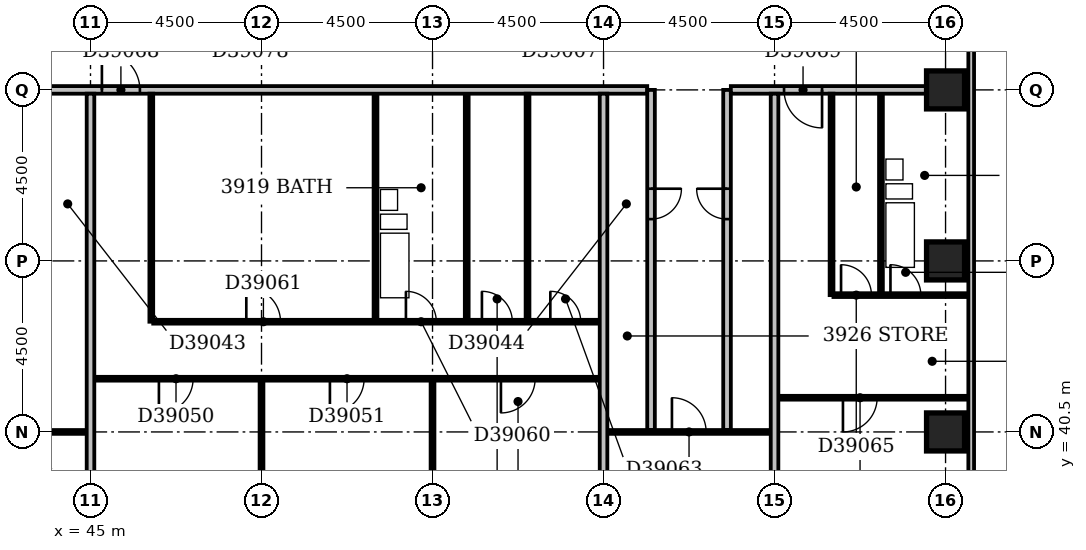
"""IFC4 building model, lengths in metres.
Left out: names, types, materials, properties, quantities, classifications, styles, units other than length and angle.
Written with IfcOpenShell. Run it as: python <this file> out.ifc"""

import sys

from ifc_helpers import new_model, si_unit, direction, frame, frame_2d, origin, origin_2d, place, context, subcontext, project, spatial, rectangle, extrude, element, fill, save


model = new_model("IFC4")
c1 = context("Model", 3, precision=1e-05, world=origin(), true_north=direction((0.0, 1.0)))
c2 = subcontext(c1, "Body", "Model", "MODEL_VIEW")
j1 = project(units=[si_unit("LENGTHUNIT", "METRE"), si_unit("PLANEANGLEUNIT", "RADIAN")], contexts=[c1])
p1 = place(None, origin())
s1 = spatial("IfcSite", under=j1, at=p1, CompositionType="ELEMENT")
p2 = place(p1, origin())
s2 = spatial("IfcBuilding", under=s1, at=p2, CompositionType="ELEMENT")
p3 = place(p2, frame((0.0, 0.0, 155.6)))
s3 = spatial("IfcBuildingStorey", under=s2, at=p3, CompositionType="ELEMENT", Elevation=155.6)
for number, where, z_axis, x_axis in (
    (1, (67.5, 40.5, -0.3), (0.0, 0.0, 1.0), (1.0, 0.0, 0.0)),
    (2, (67.5, 45.0, -0.3), (0.0, 0.0, 1.0), (1.0, 0.0, 0.0)),
    (3, (67.5, 49.5, -0.3), (0.0, 0.0, 1.0), (1.0, 0.0, 0.0)),
):
    element("IfcColumn", number, at=place(p3, frame(where, z_axis=z_axis, x_axis=x_axis)), inside=s3, PredefinedType="COLUMN", context=c2, shape_type="SweptSolid", body=[
        extrude(rectangle(XDim=1.0, YDim=1.0, at=origin_2d()), origin(), (0.0, 0.0, 1.0), 3.6),
    ])
p4 = place(p3, frame((68.175, 35.4, 0.0), z_axis=(0.0, 0.0, 1.0), x_axis=(0.0, 1.0, 0.0)))
e4 = element("IfcWall", 4, at=p4, inside=s3, PredefinedType="STANDARD", context=c2, shape_type="SweptSolid", body=[
    extrude(rectangle(XDim=23.85, YDim=0.15, at=frame_2d((11.925, 0.0))), origin(), (0.0, 0.0, 1.0), 2.7),
])
p5 = place(p4, frame((1.65, 0.0, 0.6)))
e5 = element("IfcOpeningElement", 5, at=p5, cuts=e4, PredefinedType="OPENING", context=c2, shape_type="SweptSolid", body=[
    extrude(rectangle(XDim=2.4, YDim=1.8, at=frame_2d((1.2, 0.9))), frame((0.0, 0.087, 0.0), z_axis=(0.0, -1.0, 0.0), x_axis=(1.0, 0.0, 0.0)), (0.0, 0.0, 1.0), 0.174),
])
p6 = place(p4, frame((19.65, 0.0, 0.6)))
e6 = element("IfcOpeningElement", 6, at=p6, cuts=e4, PredefinedType="OPENING", context=c2, shape_type="SweptSolid", body=[
    extrude(rectangle(XDim=2.4, YDim=1.8, at=frame_2d((1.2, 0.9))), frame((0.0, 0.087, 0.0), z_axis=(0.0, -1.0, 0.0), x_axis=(1.0, 0.0, 0.0)), (0.0, 0.0, 1.0), 0.174),
])
p7 = place(p3, frame((45.0, 36.5, 0.0), z_axis=(0.0, 0.0, 1.0), x_axis=(0.0, 1.0, 0.0)))
e7 = element("IfcWall", 7, at=p7, inside=s3, PredefinedType="PARTITIONING", context=c2, shape_type="SweptSolid", body=[
    extrude(rectangle(XDim=12.9, YDim=0.2, at=frame_2d((6.45, 0.0))), origin(), (0.0, 0.0, 1.0), 2.6),
])
p8 = place(p3, frame((49.5, 36.5, 0.0), z_axis=(0.0, 0.0, 1.0), x_axis=(0.0, 1.0, 0.0)))
e8 = element("IfcWall", 8, at=p8, inside=s3, PredefinedType="PARTITIONING", context=c2, shape_type="SweptSolid", body=[
    extrude(rectangle(XDim=5.35, YDim=0.1, at=frame_2d((2.675, 0.0))), origin(), (0.0, 0.0, 1.0), 3.3),
])
p9 = place(p3, frame((54.0, 36.5, 0.0), z_axis=(0.0, 0.0, 1.0), x_axis=(0.0, 1.0, 0.0)))
e9 = element("IfcWall", 9, at=p9, inside=s3, PredefinedType="PARTITIONING", context=c2, shape_type="SweptSolid", body=[
    extrude(rectangle(XDim=5.35, YDim=0.1, at=frame_2d((2.675, 0.0))), origin(), (0.0, 0.0, 1.0), 2.6),
])
p10 = place(p3, frame((58.5, 36.5, 0.0), z_axis=(0.0, 0.0, 1.0), x_axis=(0.0, 1.0, 0.0)))
e10 = element("IfcWall", 10, at=p10, inside=s3, PredefinedType="PARTITIONING", context=c2, shape_type="SweptSolid", body=[
    extrude(rectangle(XDim=12.9, YDim=0.2, at=frame_2d((6.45, 0.0))), origin(), (0.0, 0.0, 1.0), 3.3),
])
p11 = place(p3, frame((63.0, 36.5, 0.0), z_axis=(0.0, 0.0, 1.0), x_axis=(0.0, 1.0, 0.0)))
e11 = element("IfcWall", 11, at=p11, inside=s3, PredefinedType="PARTITIONING", context=c2, shape_type="SweptSolid", body=[
    extrude(rectangle(XDim=12.9, YDim=0.2, at=frame_2d((6.45, 0.0))), origin(), (0.0, 0.0, 1.0), 2.4),
])
p12 = place(p3, frame((40.6, 40.5, 0.0), z_axis=(0.0, 0.0, 1.0), x_axis=(1.0, 0.0, 0.0)))
e12 = element("IfcWall", 12, at=p12, inside=s3, PredefinedType="PARTITIONING", context=c2, shape_type="SweptSolid", body=[
    extrude(rectangle(XDim=4.3, YDim=0.1, at=frame_2d((2.15, 0.0))), origin(), (0.0, 0.0, 1.0), 3.3),
])
p13 = place(p12, frame((1.7, 0.0, 0.0)))
e13 = element("IfcOpeningElement", 13, at=p13, cuts=e12, PredefinedType="OPENING", context=c2, shape_type="SweptSolid", body=[
    extrude(rectangle(XDim=0.9, YDim=2.1, at=frame_2d((0.45, 1.05))), frame((0.0, 0.062, 0.0), z_axis=(0.0, -1.0, 0.0), x_axis=(1.0, 0.0, 0.0)), (0.0, 0.0, 1.0), 0.124),
])
p14 = place(p3, frame((58.6, 40.5, 0.0), z_axis=(0.0, 0.0, 1.0), x_axis=(1.0, 0.0, 0.0)))
e14 = element("IfcWall", 14, at=p14, inside=s3, PredefinedType="PARTITIONING", context=c2, shape_type="SweptSolid", body=[
    extrude(rectangle(XDim=4.3, YDim=0.1, at=frame_2d((2.15, 0.0))), origin(), (0.0, 0.0, 1.0), 3.3),
])
p15 = place(p14, frame((1.7, 0.0, 0.0)))
e15 = element("IfcOpeningElement", 15, at=p15, cuts=e14, PredefinedType="OPENING", context=c2, shape_type="SweptSolid", body=[
    extrude(rectangle(XDim=0.9, YDim=2.1, at=frame_2d((0.45, 1.05))), frame((0.0, 0.062, 0.0), z_axis=(0.0, -1.0, 0.0), x_axis=(1.0, 0.0, 0.0)), (0.0, 0.0, 1.0), 0.124),
])
p16 = place(p3, frame((59.75, 40.55, 0.0), z_axis=(0.0, 0.0, 1.0), x_axis=(0.0, 1.0, 0.0)))
e16 = element("IfcWall", 16, at=p16, inside=s3, PredefinedType="PARTITIONING", context=c2, shape_type="SweptSolid", body=[
    extrude(rectangle(XDim=8.95, YDim=0.2, at=frame_2d((4.475, 0.0))), origin(), (0.0, 0.0, 1.0), 3.3),
])
p17 = place(p16, frame((5.55, 0.0, 0.0)))
e17 = element("IfcOpeningElement", 17, at=p17, cuts=e16, PredefinedType="OPENING", context=c2, shape_type="SweptSolid", body=[
    extrude(rectangle(XDim=0.8, YDim=2.1, at=frame_2d((0.4, 1.05))), frame((0.0, 0.112, 0.0), z_axis=(0.0, -1.0, 0.0), x_axis=(1.0, 0.0, 0.0)), (0.0, 0.0, 1.0), 0.224),
])
p18 = place(p3, frame((61.75, 40.55, 0.0), z_axis=(0.0, 0.0, 1.0), x_axis=(0.0, 1.0, 0.0)))
e18 = element("IfcWall", 18, at=p18, inside=s3, PredefinedType="PARTITIONING", context=c2, shape_type="SweptSolid", body=[
    extrude(rectangle(XDim=8.95, YDim=0.2, at=frame_2d((4.475, 0.0))), origin(), (0.0, 0.0, 1.0), 3.3),
])
p19 = place(p18, frame((5.55, 0.0, 0.0)))
e19 = element("IfcOpeningElement", 19, at=p19, cuts=e18, PredefinedType="OPENING", context=c2, shape_type="SweptSolid", body=[
    extrude(rectangle(XDim=0.8, YDim=2.1, at=frame_2d((0.4, 1.05))), frame((0.0, 0.112, 0.0), z_axis=(0.0, -1.0, 0.0), x_axis=(1.0, 0.0, 0.0)), (0.0, 0.0, 1.0), 0.224),
])
p20 = place(p3, frame((63.1, 41.4, 0.0), z_axis=(0.0, 0.0, 1.0), x_axis=(1.0, 0.0, 0.0)))
e20 = element("IfcWall", 20, at=p20, inside=s3, PredefinedType="PARTITIONING", context=c2, shape_type="SweptSolid", body=[
    extrude(rectangle(XDim=5.0, YDim=0.1, at=frame_2d((2.5, 0.0))), origin(), (0.0, 0.0, 1.0), 3.3),
])
p21 = place(p20, frame((1.7, 0.0, 0.0)))
e21 = element("IfcOpeningElement", 21, at=p21, cuts=e20, PredefinedType="OPENING", context=c2, shape_type="SweptSolid", body=[
    extrude(rectangle(XDim=0.9, YDim=2.1, at=frame_2d((0.45, 1.05))), frame((0.0, 0.062, 0.0), z_axis=(0.0, -1.0, 0.0), x_axis=(1.0, 0.0, 0.0)), (0.0, 0.0, 1.0), 0.124),
])
p22 = place(p3, frame((45.1, 41.9, 0.0), z_axis=(0.0, 0.0, 1.0), x_axis=(1.0, 0.0, 0.0)))
e22 = element("IfcWall", 22, at=p22, inside=s3, PredefinedType="PARTITIONING", context=c2, shape_type="SweptSolid", body=[
    extrude(rectangle(XDim=13.3, YDim=0.1, at=frame_2d((6.65, 0.0))), origin(), (0.0, 0.0, 1.0), 3.3),
])
p23 = place(p22, frame((1.7, 0.0, 0.0)))
e23 = element("IfcOpeningElement", 23, at=p23, cuts=e22, PredefinedType="OPENING", context=c2, shape_type="SweptSolid", body=[
    extrude(rectangle(XDim=0.9, YDim=2.1, at=frame_2d((0.45, 1.05))), frame((0.0, 0.062, 0.0), z_axis=(0.0, -1.0, 0.0), x_axis=(1.0, 0.0, 0.0)), (0.0, 0.0, 1.0), 0.124),
])
p24 = place(p22, frame((6.2, 0.0, 0.0)))
e24 = element("IfcOpeningElement", 24, at=p24, cuts=e22, PredefinedType="OPENING", context=c2, shape_type="SweptSolid", body=[
    extrude(rectangle(XDim=0.9, YDim=2.1, at=frame_2d((0.45, 1.05))), frame((0.0, 0.062, 0.0), z_axis=(0.0, -1.0, 0.0), x_axis=(1.0, 0.0, 0.0)), (0.0, 0.0, 1.0), 0.124),
])
p25 = place(p22, frame((10.7, 0.0, 0.0)))
e25 = element("IfcOpeningElement", 25, at=p25, cuts=e22, PredefinedType="OPENING", context=c2, shape_type="SweptSolid", body=[
    extrude(rectangle(XDim=0.9, YDim=2.1, at=frame_2d((0.45, 1.05))), frame((0.0, 0.062, 0.0), z_axis=(0.0, -1.0, 0.0), x_axis=(1.0, 0.0, 0.0)), (0.0, 0.0, 1.0), 0.124),
])
p26 = place(p3, frame((46.6, 43.4, 0.0), z_axis=(0.0, 0.0, 1.0), x_axis=(0.0, 1.0, 0.0)))
e26 = element("IfcWall", 26, at=p26, inside=s3, PredefinedType="PARTITIONING", context=c2, shape_type="SweptSolid", body=[
    extrude(rectangle(XDim=6.0, YDim=0.1, at=frame_2d((3.0, 0.0))), origin(), (0.0, 0.0, 1.0), 3.3),
])
p27 = place(p3, frame((46.65, 43.4, 0.0), z_axis=(0.0, 0.0, 1.0), x_axis=(1.0, 0.0, 0.0)))
e27 = element("IfcWall", 27, at=p27, inside=s3, PredefinedType="PARTITIONING", context=c2, shape_type="SweptSolid", body=[
    extrude(rectangle(XDim=11.75, YDim=0.1, at=frame_2d((5.875, 0.0))), origin(), (0.0, 0.0, 1.0), 3.3),
])
p28 = place(p27, frame((6.65, 0.0, 0.0)))
e28 = element("IfcOpeningElement", 28, at=p28, cuts=e27, PredefinedType="OPENING", context=c2, shape_type="SweptSolid", body=[
    extrude(rectangle(XDim=0.8, YDim=2.1, at=frame_2d((0.4, 1.05))), frame((0.0, 0.062, 0.0), z_axis=(0.0, -1.0, 0.0), x_axis=(1.0, 0.0, 0.0)), (0.0, 0.0, 1.0), 0.124),
])
p29 = place(p27, frame((2.45, 0.0, 0.0)))
e29 = element("IfcOpeningElement", 29, at=p29, cuts=e27, PredefinedType="OPENING", context=c2, shape_type="SweptSolid", body=[
    extrude(rectangle(XDim=0.9, YDim=2.1, at=frame_2d((0.45, 1.05))), frame((0.0, 0.062, 0.0), z_axis=(0.0, -1.0, 0.0), x_axis=(1.0, 0.0, 0.0)), (0.0, 0.0, 1.0), 0.124),
])
p30 = place(p27, frame((8.65, 0.0, 0.0)))
e30 = element("IfcOpeningElement", 30, at=p30, cuts=e27, PredefinedType="OPENING", context=c2, shape_type="SweptSolid", body=[
    extrude(rectangle(XDim=0.8, YDim=2.1, at=frame_2d((0.4, 1.05))), frame((0.0, 0.062, 0.0), z_axis=(0.0, -1.0, 0.0), x_axis=(1.0, 0.0, 0.0)), (0.0, 0.0, 1.0), 0.124),
])
p31 = place(p27, frame((10.45, 0.0, 0.0)))
e31 = element("IfcOpeningElement", 31, at=p31, cuts=e27, PredefinedType="OPENING", context=c2, shape_type="SweptSolid", body=[
    extrude(rectangle(XDim=0.8, YDim=2.1, at=frame_2d((0.4, 1.05))), frame((0.0, 0.062, 0.0), z_axis=(0.0, -1.0, 0.0), x_axis=(1.0, 0.0, 0.0)), (0.0, 0.0, 1.0), 0.124),
])
for number, where, z_axis, x_axis in (
    (32, (52.5, 43.45, 0.0), (0.0, 0.0, 1.0), (0.0, 1.0, 0.0)),
    (33, (54.9, 43.45, 0.0), (0.0, 0.0, 1.0), (0.0, 1.0, 0.0)),
):
    element("IfcWall", number, at=place(p3, frame(where, z_axis=z_axis, x_axis=x_axis)), inside=s3, PredefinedType="PLUMBINGWALL", context=c2, shape_type="SweptSolid", body=[
        extrude(rectangle(XDim=5.95, YDim=0.1, at=frame_2d((2.975, 0.0))), origin(), (0.0, 0.0, 1.0), 3.3),
    ])
p32 = place(p3, frame((56.5, 43.45, 0.0), z_axis=(0.0, 0.0, 1.0), x_axis=(0.0, 1.0, 0.0)))
e34 = element("IfcWall", 34, at=p32, inside=s3, PredefinedType="PARTITIONING", context=c2, shape_type="SweptSolid", body=[
    extrude(rectangle(XDim=5.95, YDim=0.1, at=frame_2d((2.975, 0.0))), origin(), (0.0, 0.0, 1.0), 3.3),
])
p33 = place(p3, frame((64.5, 44.1, 0.0), z_axis=(0.0, 0.0, 1.0), x_axis=(0.0, 1.0, 0.0)))
e35 = element("IfcWall", 35, at=p33, inside=s3, PredefinedType="PARTITIONING", context=c2, shape_type="SweptSolid", body=[
    extrude(rectangle(XDim=5.3, YDim=0.1, at=frame_2d((2.65, 0.0))), origin(), (0.0, 0.0, 1.0), 3.3),
])
p34 = place(p3, frame((64.55, 44.1, 0.0), z_axis=(0.0, 0.0, 1.0), x_axis=(1.0, 0.0, 0.0)))
e36 = element("IfcWall", 36, at=p34, inside=s3, PredefinedType="PARTITIONING", context=c2, shape_type="SweptSolid", body=[
    extrude(rectangle(XDim=3.55, YDim=0.1, at=frame_2d((1.775, 0.0))), origin(), (0.0, 0.0, 1.0), 3.3),
])
p35 = place(p34, frame((1.5, 0.0, 0.0)))
e37 = element("IfcOpeningElement", 37, at=p35, cuts=e36, PredefinedType="OPENING", context=c2, shape_type="SweptSolid", body=[
    extrude(rectangle(XDim=0.8, YDim=2.1, at=frame_2d((0.4, 1.05))), frame((0.0, 0.062, 0.0), z_axis=(0.0, -1.0, 0.0), x_axis=(1.0, 0.0, 0.0)), (0.0, 0.0, 1.0), 0.124),
])
p36 = place(p34, frame((0.2, 0.0, 0.0)))
e38 = element("IfcOpeningElement", 38, at=p36, cuts=e36, PredefinedType="OPENING", context=c2, shape_type="SweptSolid", body=[
    extrude(rectangle(XDim=0.8, YDim=2.1, at=frame_2d((0.4, 1.05))), frame((0.0, 0.062, 0.0), z_axis=(0.0, -1.0, 0.0), x_axis=(1.0, 0.0, 0.0)), (0.0, 0.0, 1.0), 0.124),
])
p37 = place(p3, frame((65.8, 44.15, 0.0), z_axis=(0.0, 0.0, 1.0), x_axis=(0.0, 1.0, 0.0)))
e39 = element("IfcWall", 39, at=p37, inside=s3, PredefinedType="PLUMBINGWALL", context=c2, shape_type="SweptSolid", body=[
    extrude(rectangle(XDim=5.25, YDim=0.1, at=frame_2d((2.625, 0.0))), origin(), (0.0, 0.0, 1.0), 3.3),
])
p38 = place(p3, frame((43.85, 49.5, 0.0), z_axis=(0.0, 0.0, 1.0), x_axis=(1.0, 0.0, 0.0)))
e40 = element("IfcWall", 40, at=p38, inside=s3, PredefinedType="PARTITIONING", context=c2, shape_type="SweptSolid", body=[
    extrude(rectangle(XDim=15.8, YDim=0.2, at=frame_2d((7.9, 0.0))), origin(), (0.0, 0.0, 1.0), 3.3),
])
p39 = place(p38, frame((1.45, 0.0, 0.0)))
e41 = element("IfcOpeningElement", 41, at=p39, cuts=e40, PredefinedType="OPENING", context=c2, shape_type="SweptSolid", body=[
    extrude(rectangle(XDim=1.0, YDim=2.1, at=frame_2d((0.5, 1.05))), frame((0.0, 0.112, 0.0), z_axis=(0.0, -1.0, 0.0), x_axis=(1.0, 0.0, 0.0)), (0.0, 0.0, 1.0), 0.224),
])
p40 = place(p3, frame((61.85, 49.5, 0.0), z_axis=(0.0, 0.0, 1.0), x_axis=(1.0, 0.0, 0.0)))
e42 = element("IfcWall", 42, at=p40, inside=s3, PredefinedType="PARTITIONING", context=c2, shape_type="SweptSolid", body=[
    extrude(rectangle(XDim=5.15, YDim=0.2, at=frame_2d((2.575, 0.0))), origin(), (0.0, 0.0, 1.0), 3.3),
])
p41 = place(p40, frame((1.4, 0.0, 0.0)))
e43 = element("IfcOpeningElement", 43, at=p41, cuts=e42, PredefinedType="OPENING", context=c2, shape_type="SweptSolid", body=[
    extrude(rectangle(XDim=1.0, YDim=2.1, at=frame_2d((0.5, 1.05))), frame((0.0, 0.112, 0.0), z_axis=(0.0, -1.0, 0.0), x_axis=(1.0, 0.0, 0.0)), (0.0, 0.0, 1.0), 0.224),
])
p42 = place(p15, origin())
e44 = element("IfcDoor", 44, at=p42, inside=s3, OperationType="SINGLE_SWING_LEFT", PredefinedType="DOOR", context=c2, shape_type="SweptSolid", body=[
    extrude(rectangle(XDim=0.9, YDim=2.1, at=frame_2d((0.45, 1.05))), frame((0.0, 0.025, 0.0), z_axis=(0.0, -1.0, 0.0), x_axis=(1.0, 0.0, 0.0)), (0.0, 0.0, 1.0), 0.05),
])
fill(e15, e44)
p43 = place(p17, origin())
e45 = element("IfcDoor", 45, at=p43, inside=s3, OperationType="SINGLE_SWING_RIGHT", PredefinedType="DOOR", context=c2, shape_type="SweptSolid", body=[
    extrude(rectangle(XDim=0.8, YDim=2.1, at=frame_2d((0.4, 1.05))), frame((0.0, 0.025, 0.0), z_axis=(0.0, -1.0, 0.0), x_axis=(1.0, 0.0, 0.0)), (0.0, 0.0, 1.0), 0.05),
])
fill(e17, e45)
p44 = place(p19, frame((0.8, 0.0, 0.0), z_axis=(0.0, 0.0, 1.0), x_axis=(-1.0, 0.0, 0.0)))
e46 = element("IfcDoor", 46, at=p44, inside=s3, OperationType="SINGLE_SWING_LEFT", PredefinedType="DOOR", context=c2, shape_type="SweptSolid", body=[
    extrude(rectangle(XDim=0.8, YDim=2.1, at=frame_2d((0.4, 1.05))), frame((0.0, 0.025, 0.0), z_axis=(0.0, -1.0, 0.0), x_axis=(1.0, 0.0, 0.0)), (0.0, 0.0, 1.0), 0.05),
])
fill(e19, e46)
p45 = place(p21, frame((0.9, 0.0, 0.0), z_axis=(0.0, 0.0, 1.0), x_axis=(-1.0, 0.0, 0.0)))
e47 = element("IfcDoor", 47, at=p45, inside=s3, OperationType="SINGLE_SWING_RIGHT", PredefinedType="DOOR", context=c2, shape_type="SweptSolid", body=[
    extrude(rectangle(XDim=0.9, YDim=2.1, at=frame_2d((0.45, 1.05))), frame((0.0, 0.025, 0.0), z_axis=(0.0, -1.0, 0.0), x_axis=(1.0, 0.0, 0.0)), (0.0, 0.0, 1.0), 0.05),
])
fill(e21, e47)
p46 = place(p23, frame((0.9, 0.0, 0.0), z_axis=(0.0, 0.0, 1.0), x_axis=(-1.0, 0.0, 0.0)))
e48 = element("IfcDoor", 48, at=p46, inside=s3, OperationType="SINGLE_SWING_RIGHT", PredefinedType="DOOR", context=c2, shape_type="SweptSolid", body=[
    extrude(rectangle(XDim=0.9, YDim=2.1, at=frame_2d((0.45, 1.05))), frame((0.0, 0.025, 0.0), z_axis=(0.0, -1.0, 0.0), x_axis=(1.0, 0.0, 0.0)), (0.0, 0.0, 1.0), 0.05),
])
fill(e23, e48)
p47 = place(p24, frame((0.9, 0.0, 0.0), z_axis=(0.0, 0.0, 1.0), x_axis=(-1.0, 0.0, 0.0)))
e49 = element("IfcDoor", 49, at=p47, inside=s3, OperationType="SINGLE_SWING_RIGHT", PredefinedType="DOOR", context=c2, shape_type="SweptSolid", body=[
    extrude(rectangle(XDim=0.9, YDim=2.1, at=frame_2d((0.45, 1.05))), frame((0.0, 0.025, 0.0), z_axis=(0.0, -1.0, 0.0), x_axis=(1.0, 0.0, 0.0)), (0.0, 0.0, 1.0), 0.05),
])
fill(e24, e49)
p48 = place(p25, frame((0.9, 0.0, 0.0), z_axis=(0.0, 0.0, 1.0), x_axis=(-1.0, 0.0, 0.0)))
e50 = element("IfcDoor", 50, at=p48, inside=s3, OperationType="SINGLE_SWING_RIGHT", PredefinedType="DOOR", context=c2, shape_type="SweptSolid", body=[
    extrude(rectangle(XDim=0.9, YDim=2.1, at=frame_2d((0.45, 1.05))), frame((0.0, 0.025, 0.0), z_axis=(0.0, -1.0, 0.0), x_axis=(1.0, 0.0, 0.0)), (0.0, 0.0, 1.0), 0.05),
])
fill(e25, e50)
p49 = place(p28, origin())
e51 = element("IfcDoor", 51, at=p49, inside=s3, OperationType="SINGLE_SWING_LEFT", PredefinedType="DOOR", context=c2, shape_type="SweptSolid", body=[
    extrude(rectangle(XDim=0.8, YDim=2.1, at=frame_2d((0.4, 1.05))), frame((0.0, 0.025, 0.0), z_axis=(0.0, -1.0, 0.0), x_axis=(1.0, 0.0, 0.0)), (0.0, 0.0, 1.0), 0.05),
])
fill(e28, e51)
p50 = place(p29, origin())
e52 = element("IfcDoor", 52, at=p50, inside=s3, OperationType="SINGLE_SWING_LEFT", PredefinedType="DOOR", context=c2, shape_type="SweptSolid", body=[
    extrude(rectangle(XDim=0.9, YDim=2.1, at=frame_2d((0.45, 1.05))), frame((0.0, 0.025, 0.0), z_axis=(0.0, -1.0, 0.0), x_axis=(1.0, 0.0, 0.0)), (0.0, 0.0, 1.0), 0.05),
])
fill(e29, e52)
p51 = place(p30, origin())
e53 = element("IfcDoor", 53, at=p51, inside=s3, OperationType="SINGLE_SWING_LEFT", PredefinedType="DOOR", context=c2, shape_type="SweptSolid", body=[
    extrude(rectangle(XDim=0.8, YDim=2.1, at=frame_2d((0.4, 1.05))), frame((0.0, 0.025, 0.0), z_axis=(0.0, -1.0, 0.0), x_axis=(1.0, 0.0, 0.0)), (0.0, 0.0, 1.0), 0.05),
])
fill(e30, e53)
p52 = place(p31, origin())
e54 = element("IfcDoor", 54, at=p52, inside=s3, OperationType="SINGLE_SWING_LEFT", PredefinedType="DOOR", context=c2, shape_type="SweptSolid", body=[
    extrude(rectangle(XDim=0.8, YDim=2.1, at=frame_2d((0.4, 1.05))), frame((0.0, 0.025, 0.0), z_axis=(0.0, -1.0, 0.0), x_axis=(1.0, 0.0, 0.0)), (0.0, 0.0, 1.0), 0.05),
])
fill(e31, e54)
p53 = place(p35, origin())
e55 = element("IfcDoor", 55, at=p53, inside=s3, OperationType="SINGLE_SWING_LEFT", PredefinedType="DOOR", context=c2, shape_type="SweptSolid", body=[
    extrude(rectangle(XDim=0.8, YDim=2.1, at=frame_2d((0.4, 1.05))), frame((0.0, 0.025, 0.0), z_axis=(0.0, -1.0, 0.0), x_axis=(1.0, 0.0, 0.0)), (0.0, 0.0, 1.0), 0.05),
])
fill(e37, e55)
p54 = place(p36, origin())
e56 = element("IfcDoor", 56, at=p54, inside=s3, OperationType="SINGLE_SWING_LEFT", PredefinedType="DOOR", context=c2, shape_type="SweptSolid", body=[
    extrude(rectangle(XDim=0.8, YDim=2.1, at=frame_2d((0.4, 1.05))), frame((0.0, 0.025, 0.0), z_axis=(0.0, -1.0, 0.0), x_axis=(1.0, 0.0, 0.0)), (0.0, 0.0, 1.0), 0.05),
])
fill(e38, e56)
p55 = place(p39, origin())
e57 = element("IfcDoor", 57, at=p55, inside=s3, OperationType="SINGLE_SWING_LEFT", PredefinedType="DOOR", context=c2, shape_type="SweptSolid", body=[
    extrude(rectangle(XDim=1.0, YDim=2.1, at=frame_2d((0.5, 1.05))), frame((0.0, 0.025, 0.0), z_axis=(0.0, -1.0, 0.0), x_axis=(1.0, 0.0, 0.0)), (0.0, 0.0, 1.0), 0.05),
])
fill(e41, e57)
p56 = place(p41, origin())
e58 = element("IfcDoor", 58, at=p56, inside=s3, OperationType="SINGLE_SWING_RIGHT", PredefinedType="DOOR", context=c2, shape_type="SweptSolid", body=[
    extrude(rectangle(XDim=1.0, YDim=2.1, at=frame_2d((0.5, 1.05))), frame((0.0, 0.025, 0.0), z_axis=(0.0, -1.0, 0.0), x_axis=(1.0, 0.0, 0.0)), (0.0, 0.0, 1.0), 0.05),
])
fill(e43, e58)
save(model, sys.argv[1])
